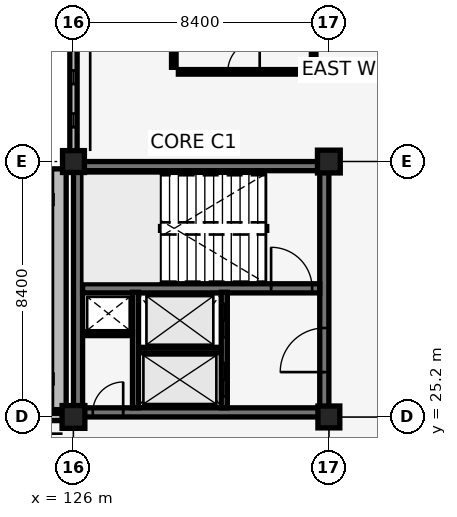
"""IFC4 building model, lengths in metres.
Left out: names, types, materials, properties, quantities, classifications, styles, units other than length and angle.
Written with IfcOpenShell. Run it as: python <this file> out.ifc"""

import sys

from ifc_helpers import new_model, si_unit, direction, frame, frame_2d, origin, origin_2d, place, context, subcontext, project, spatial, rectangle, extrude, element, fill, save


model = new_model("IFC4")
c1 = context("Model", 3, precision=1e-05, world=origin(), true_north=direction((0.0, 1.0)))
c2 = subcontext(c1, "Body", "Model", "MODEL_VIEW")
j1 = project(units=[si_unit("LENGTHUNIT", "METRE"), si_unit("PLANEANGLEUNIT", "RADIAN")], contexts=[c1])
p1 = place(None, origin())
s1 = spatial("IfcSite", under=j1, at=p1, CompositionType="ELEMENT")
p2 = place(p1, origin())
s2 = spatial("IfcBuilding", under=s1, at=p2, CompositionType="ELEMENT")
p3 = place(p2, frame((0.0, 0.0, 5.44)))
s3 = spatial("IfcBuildingStorey", under=s2, at=p3, CompositionType="ELEMENT", Elevation=5.44)
p4 = place(p3, frame((126.15, 25.35, 0.0), z_axis=(0.0, 0.0, 1.0), x_axis=(1.0, 0.0, 0.0)))
e1 = element("IfcWall", 1, at=p4, inside=s3, PredefinedType="SHEAR", context=c2, shape_type="SweptSolid", body=[
    extrude(rectangle(XDim=8.1, YDim=0.3, at=frame_2d((4.05, 0.0))), origin(), (0.0, 0.0, 1.0), 4.12),
])
p5 = place(p4, frame((0.485, 0.0, 0.0)))
e2 = element("IfcOpeningElement", 2, at=p5, cuts=e1, PredefinedType="OPENING", context=c2, shape_type="SweptSolid", body=[
    extrude(rectangle(XDim=1.0, YDim=2.15, at=frame_2d((0.5, 1.075))), frame((0.0, 0.16, 0.0), z_axis=(0.0, -1.0, 0.0), x_axis=(1.0, 0.0, 0.0)), (0.0, 0.0, 1.0), 0.32),
])
p6 = place(p3, frame((126.15, 33.45, 0.0), z_axis=(0.0, 0.0, 1.0), x_axis=(1.0, 0.0, 0.0)))
e3 = element("IfcWall", 3, at=p6, inside=s3, PredefinedType="SHEAR", context=c2, shape_type="SweptSolid", body=[
    extrude(rectangle(XDim=8.1, YDim=0.3, at=frame_2d((4.05, 0.0))), origin(), (0.0, 0.0, 1.0), 4.12),
])
p7 = place(p3, frame((126.15, 25.35, 0.0), z_axis=(0.0, 0.0, 1.0), x_axis=(0.0, 1.0, 0.0)))
e4 = element("IfcWall", 4, at=p7, inside=s3, PredefinedType="SHEAR", context=c2, shape_type="SweptSolid", body=[
    extrude(rectangle(XDim=8.1, YDim=0.3, at=frame_2d((4.05, 0.0))), origin(), (0.0, 0.0, 1.0), 4.12),
])
p8 = place(p3, frame((134.25, 25.35, 0.0), z_axis=(0.0, 0.0, 1.0), x_axis=(0.0, 1.0, 0.0)))
e5 = element("IfcWall", 5, at=p8, inside=s3, PredefinedType="SHEAR", context=c2, shape_type="SweptSolid", body=[
    extrude(rectangle(XDim=8.1, YDim=0.3, at=frame_2d((4.05, 0.0))), origin(), (0.0, 0.0, 1.0), 4.12),
])
p9 = place(p8, frame((1.325, 0.0, 0.0)))
e6 = element("IfcOpeningElement", 6, at=p9, cuts=e5, PredefinedType="OPENING", context=c2, shape_type="SweptSolid", body=[
    extrude(rectangle(XDim=1.45, YDim=2.15, at=frame_2d((0.725, 1.075))), frame((0.0, 0.16, 0.0), z_axis=(0.0, -1.0, 0.0), x_axis=(1.0, 0.0, 0.0)), (0.0, 0.0, 1.0), 0.32),
])
p10 = place(p3, frame((126.3, 29.43, 0.0), z_axis=(0.0, 0.0, 1.0), x_axis=(1.0, 0.0, 0.0)))
e7 = element("IfcWall", 7, at=p10, inside=s3, PredefinedType="SHEAR", context=c2, shape_type="SweptSolid", body=[
    extrude(rectangle(XDim=7.8, YDim=0.3, at=frame_2d((3.9, 0.0))), origin(), (0.0, 0.0, 1.0), 4.12),
])
p11 = place(p10, frame((6.2, 0.0, 0.0)))
e8 = element("IfcOpeningElement", 8, at=p11, cuts=e7, PredefinedType="OPENING", context=c2, shape_type="SweptSolid", body=[
    extrude(rectangle(XDim=1.35, YDim=2.15, at=frame_2d((0.675, 1.075))), frame((0.0, 0.16, 0.0), z_axis=(0.0, -1.0, 0.0), x_axis=(1.0, 0.0, 0.0)), (0.0, 0.0, 1.0), 0.32),
])
p12 = place(p3, frame((126.0, 25.2, 0.0), z_axis=(0.0, 0.0, 1.0), x_axis=(1.0, 0.0, 0.0)))
e9 = element("IfcColumn", 9, at=p12, inside=s3, PredefinedType="COLUMN", context=c2, shape_type="SweptSolid", body=[
    extrude(rectangle(XDim=0.75, YDim=0.75, at=origin_2d()), origin(), (0.0, 0.0, 1.0), 4.12),
])
for number, where, z_axis, x_axis in (
    (10, (126.0, 33.6, 0.0), (0.0, 0.0, 1.0), (1.0, 0.0, 0.0)),
    (11, (134.4, 25.2, 0.0), (0.0, 0.0, 1.0), (1.0, 0.0, 0.0)),
):
    element("IfcColumn", number, at=place(p3, frame(where, z_axis=z_axis, x_axis=x_axis)), inside=s3, PredefinedType="COLUMN", context=c2, shape_type="SweptSolid", body=[
        extrude(rectangle(XDim=0.72, YDim=0.72, at=origin_2d()), origin(), (0.0, 0.0, 1.0), 4.12),
    ])
p13 = place(p3, frame((134.4, 33.6, 0.0), z_axis=(0.0, 0.0, 1.0), x_axis=(1.0, 0.0, 0.0)))
e12 = element("IfcColumn", 12, at=p13, inside=s3, PredefinedType="COLUMN", context=c2, shape_type="SweptSolid", body=[
    extrude(rectangle(XDim=0.75, YDim=0.75, at=origin_2d()), origin(), (0.0, 0.0, 1.0), 4.12),
])
p14 = place(p3, frame((117.845, 25.2, 0.0), z_axis=(0.0, 0.0, 1.0), x_axis=(1.0, 0.0, 0.0)))
e13 = element("IfcWall", 13, at=p14, inside=s3, PredefinedType="SOLIDWALL", context=c2, shape_type="SweptSolid", body=[
    extrude(rectangle(XDim=7.795, YDim=0.24, at=frame_2d((3.897, 0.0))), origin(), (0.0, 0.0, 1.0), 3.37),
])
p15 = place(p14, frame((0.8, 0.0, 0.35)))
e14 = element("IfcOpeningElement", 14, at=p15, cuts=e13, PredefinedType="OPENING", context=c2, shape_type="SweptSolid", body=[
    extrude(rectangle(XDim=0.44, YDim=1.25, at=frame_2d((0.22, 0.625))), frame((0.0, 0.13, 0.0), z_axis=(0.0, -1.0, 0.0), x_axis=(1.0, 0.0, 0.0)), (0.0, 0.0, 1.0), 0.26),
])
p16 = place(p14, frame((2.239, 0.0, 0.35)))
e15 = element("IfcOpeningElement", 15, at=p16, cuts=e13, PredefinedType="OPENING", context=c2, shape_type="SweptSolid", body=[
    extrude(rectangle(XDim=0.44, YDim=1.25, at=frame_2d((0.22, 0.625))), frame((0.0, 0.13, 0.0), z_axis=(0.0, -1.0, 0.0), x_axis=(1.0, 0.0, 0.0)), (0.0, 0.0, 1.0), 0.26),
])
p17 = place(p14, frame((3.677, 0.0, 0.35)))
e16 = element("IfcOpeningElement", 16, at=p17, cuts=e13, PredefinedType="OPENING", context=c2, shape_type="SweptSolid", body=[
    extrude(rectangle(XDim=0.44, YDim=1.25, at=frame_2d((0.22, 0.625))), frame((0.0, 0.13, 0.0), z_axis=(0.0, -1.0, 0.0), x_axis=(1.0, 0.0, 0.0)), (0.0, 0.0, 1.0), 0.26),
])
p18 = place(p14, frame((5.116, 0.0, 0.35)))
e17 = element("IfcOpeningElement", 17, at=p18, cuts=e13, PredefinedType="OPENING", context=c2, shape_type="SweptSolid", body=[
    extrude(rectangle(XDim=0.44, YDim=1.25, at=frame_2d((0.22, 0.625))), frame((0.0, 0.13, 0.0), z_axis=(0.0, -1.0, 0.0), x_axis=(1.0, 0.0, 0.0)), (0.0, 0.0, 1.0), 0.26),
])
p19 = place(p14, frame((0.8, 0.0, 1.8)))
e18 = element("IfcOpeningElement", 18, at=p19, cuts=e13, PredefinedType="OPENING", context=c2, shape_type="SweptSolid", body=[
    extrude(rectangle(XDim=0.44, YDim=1.25, at=frame_2d((0.22, 0.625))), frame((0.0, 0.13, 0.0), z_axis=(0.0, -1.0, 0.0), x_axis=(1.0, 0.0, 0.0)), (0.0, 0.0, 1.0), 0.26),
])
p20 = place(p14, frame((2.239, 0.0, 1.8)))
e19 = element("IfcOpeningElement", 19, at=p20, cuts=e13, PredefinedType="OPENING", context=c2, shape_type="SweptSolid", body=[
    extrude(rectangle(XDim=0.44, YDim=1.25, at=frame_2d((0.22, 0.625))), frame((0.0, 0.13, 0.0), z_axis=(0.0, -1.0, 0.0), x_axis=(1.0, 0.0, 0.0)), (0.0, 0.0, 1.0), 0.26),
])
p21 = place(p14, frame((3.677, 0.0, 1.8)))
e20 = element("IfcOpeningElement", 20, at=p21, cuts=e13, PredefinedType="OPENING", context=c2, shape_type="SweptSolid", body=[
    extrude(rectangle(XDim=0.44, YDim=1.25, at=frame_2d((0.22, 0.625))), frame((0.0, 0.13, 0.0), z_axis=(0.0, -1.0, 0.0), x_axis=(1.0, 0.0, 0.0)), (0.0, 0.0, 1.0), 0.26),
])
p22 = place(p14, frame((5.116, 0.0, 1.8)))
e21 = element("IfcOpeningElement", 21, at=p22, cuts=e13, PredefinedType="OPENING", context=c2, shape_type="SweptSolid", body=[
    extrude(rectangle(XDim=0.44, YDim=1.25, at=frame_2d((0.22, 0.625))), frame((0.0, 0.13, 0.0), z_axis=(0.0, -1.0, 0.0), x_axis=(1.0, 0.0, 0.0)), (0.0, 0.0, 1.0), 0.26),
])
p23 = place(p3, frame((125.52, 25.44, 0.0), z_axis=(0.0, 0.0, 1.0), x_axis=(0.0, 1.0, 0.0)))
e22 = element("IfcWall", 22, at=p23, inside=s3, PredefinedType="SOLIDWALL", context=c2, shape_type="SweptSolid", body=[
    extrude(rectangle(XDim=7.92, YDim=0.48, at=frame_2d((3.96, 0.0))), origin(), (0.0, 0.0, 1.0), 4.42),
])
p24 = place(p3, frame((126.0, 33.945, 0.0), z_axis=(0.0, 0.0, 1.0), x_axis=(0.0, 1.0, 0.0)))
e23 = element("IfcWall", 23, at=p24, inside=s3, PredefinedType="SOLIDWALL", context=c2, shape_type="SweptSolid", body=[
    extrude(rectangle(XDim=7.695, YDim=0.24, at=frame_2d((3.847, 0.0))), origin(), (0.0, 0.0, 1.0), 3.37),
])
p25 = place(p24, frame((0.79, 0.0, 0.35)))
e24 = element("IfcOpeningElement", 24, at=p25, cuts=e23, PredefinedType="OPENING", context=c2, shape_type="SweptSolid", body=[
    extrude(rectangle(XDim=0.44, YDim=1.25, at=frame_2d((0.22, 0.625))), frame((0.0, 0.13, 0.0), z_axis=(0.0, -1.0, 0.0), x_axis=(1.0, 0.0, 0.0)), (0.0, 0.0, 1.0), 0.26),
])
p26 = place(p24, frame((2.208, 0.0, 0.35)))
e25 = element("IfcOpeningElement", 25, at=p26, cuts=e23, PredefinedType="OPENING", context=c2, shape_type="SweptSolid", body=[
    extrude(rectangle(XDim=0.44, YDim=1.25, at=frame_2d((0.22, 0.625))), frame((0.0, 0.13, 0.0), z_axis=(0.0, -1.0, 0.0), x_axis=(1.0, 0.0, 0.0)), (0.0, 0.0, 1.0), 0.26),
])
p27 = place(p24, frame((3.627, 0.0, 0.35)))
e26 = element("IfcOpeningElement", 26, at=p27, cuts=e23, PredefinedType="OPENING", context=c2, shape_type="SweptSolid", body=[
    extrude(rectangle(XDim=0.44, YDim=1.25, at=frame_2d((0.22, 0.625))), frame((0.0, 0.13, 0.0), z_axis=(0.0, -1.0, 0.0), x_axis=(1.0, 0.0, 0.0)), (0.0, 0.0, 1.0), 0.26),
])
p28 = place(p24, frame((5.046, 0.0, 0.35)))
e27 = element("IfcOpeningElement", 27, at=p28, cuts=e23, PredefinedType="OPENING", context=c2, shape_type="SweptSolid", body=[
    extrude(rectangle(XDim=0.44, YDim=1.25, at=frame_2d((0.22, 0.625))), frame((0.0, 0.13, 0.0), z_axis=(0.0, -1.0, 0.0), x_axis=(1.0, 0.0, 0.0)), (0.0, 0.0, 1.0), 0.26),
])
p29 = place(p24, frame((6.466, 0.0, 0.35)))
e28 = element("IfcOpeningElement", 28, at=p29, cuts=e23, PredefinedType="OPENING", context=c2, shape_type="SweptSolid", body=[
    extrude(rectangle(XDim=0.44, YDim=1.25, at=frame_2d((0.22, 0.625))), frame((0.0, 0.13, 0.0), z_axis=(0.0, -1.0, 0.0), x_axis=(1.0, 0.0, 0.0)), (0.0, 0.0, 1.0), 0.26),
])
p30 = place(p24, frame((0.79, 0.0, 1.8)))
e29 = element("IfcOpeningElement", 29, at=p30, cuts=e23, PredefinedType="OPENING", context=c2, shape_type="SweptSolid", body=[
    extrude(rectangle(XDim=0.44, YDim=1.25, at=frame_2d((0.22, 0.625))), frame((0.0, 0.13, 0.0), z_axis=(0.0, -1.0, 0.0), x_axis=(1.0, 0.0, 0.0)), (0.0, 0.0, 1.0), 0.26),
])
p31 = place(p24, frame((2.208, 0.0, 1.8)))
e30 = element("IfcOpeningElement", 30, at=p31, cuts=e23, PredefinedType="OPENING", context=c2, shape_type="SweptSolid", body=[
    extrude(rectangle(XDim=0.44, YDim=1.25, at=frame_2d((0.22, 0.625))), frame((0.0, 0.13, 0.0), z_axis=(0.0, -1.0, 0.0), x_axis=(1.0, 0.0, 0.0)), (0.0, 0.0, 1.0), 0.26),
])
p32 = place(p24, frame((3.627, 0.0, 1.8)))
e31 = element("IfcOpeningElement", 31, at=p32, cuts=e23, PredefinedType="OPENING", context=c2, shape_type="SweptSolid", body=[
    extrude(rectangle(XDim=0.44, YDim=1.25, at=frame_2d((0.22, 0.625))), frame((0.0, 0.13, 0.0), z_axis=(0.0, -1.0, 0.0), x_axis=(1.0, 0.0, 0.0)), (0.0, 0.0, 1.0), 0.26),
])
p33 = place(p24, frame((5.046, 0.0, 1.8)))
e32 = element("IfcOpeningElement", 32, at=p33, cuts=e23, PredefinedType="OPENING", context=c2, shape_type="SweptSolid", body=[
    extrude(rectangle(XDim=0.44, YDim=1.25, at=frame_2d((0.22, 0.625))), frame((0.0, 0.13, 0.0), z_axis=(0.0, -1.0, 0.0), x_axis=(1.0, 0.0, 0.0)), (0.0, 0.0, 1.0), 0.26),
])
p34 = place(p24, frame((6.466, 0.0, 1.8)))
e33 = element("IfcOpeningElement", 33, at=p34, cuts=e23, PredefinedType="OPENING", context=c2, shape_type="SweptSolid", body=[
    extrude(rectangle(XDim=0.44, YDim=1.25, at=frame_2d((0.22, 0.625))), frame((0.0, 0.13, 0.0), z_axis=(0.0, -1.0, 0.0), x_axis=(1.0, 0.0, 0.0)), (0.0, 0.0, 1.0), 0.26),
])
p35 = place(p3, frame((130.96, 25.5, 0.0), z_axis=(0.0, 0.0, 1.0), x_axis=(0.0, 1.0, 0.0)))
e34 = element("IfcWall", 34, at=p35, inside=s3, PredefinedType="SHEAR", context=c2, shape_type="SweptSolid", body=[
    extrude(rectangle(XDim=3.8, YDim=0.2, at=frame_2d((1.9, 0.0))), origin(), (0.0, 0.0, 1.0), 3.44),
])
p36 = place(p35, frame((0.375, 0.0, 0.0)))
e35 = element("IfcOpeningElement", 35, at=p36, cuts=e34, PredefinedType="OPENING", context=c2, shape_type="SweptSolid", body=[
    extrude(rectangle(XDim=1.1, YDim=2.15, at=frame_2d((0.55, 1.075))), frame((0.0, 0.11, 0.0), z_axis=(0.0, -1.0, 0.0), x_axis=(1.0, 0.0, 0.0)), (0.0, 0.0, 1.0), 0.22),
])
p37 = place(p35, frame((2.325, 0.0, 0.0)))
e36 = element("IfcOpeningElement", 36, at=p37, cuts=e34, PredefinedType="OPENING", context=c2, shape_type="SweptSolid", body=[
    extrude(rectangle(XDim=1.1, YDim=2.15, at=frame_2d((0.55, 1.075))), frame((0.0, 0.11, 0.0), z_axis=(0.0, -1.0, 0.0), x_axis=(1.0, 0.0, 0.0)), (0.0, 0.0, 1.0), 0.22),
])
p38 = place(p3, frame((128.04, 25.5, 0.0), z_axis=(0.0, 0.0, 1.0), x_axis=(0.0, 1.0, 0.0)))
e37 = element("IfcWall", 37, at=p38, inside=s3, PredefinedType="SHEAR", context=c2, shape_type="SweptSolid", body=[
    extrude(rectangle(XDim=3.8, YDim=0.2, at=frame_2d((1.9, 0.0))), origin(), (0.0, 0.0, 1.0), 3.44),
])
p39 = place(p3, frame((128.15, 27.4, 0.0), z_axis=(0.0, 0.0, 1.0), x_axis=(1.0, 0.0, 0.0)))
e38 = element("IfcWall", 38, at=p39, inside=s3, PredefinedType="SHEAR", context=c2, shape_type="SweptSolid", body=[
    extrude(rectangle(XDim=2.7, YDim=0.18, at=frame_2d((1.35, 0.0))), origin(), (0.0, 0.0, 1.0), 4.12),
])
p40 = place(p3, frame((126.32, 27.94, 0.0), z_axis=(0.0, 0.0, 1.0), x_axis=(1.0, 0.0, 0.0)))
e39 = element("IfcWall", 39, at=p40, inside=s3, PredefinedType="PARTITIONING", context=c2, shape_type="SweptSolid", body=[
    extrude(rectangle(XDim=1.62, YDim=0.13, at=frame_2d((0.81, 0.0))), origin(), (0.0, 0.0, 1.0), 3.37),
])
p41 = place(p3, frame((129.45, 36.55, 0.0), z_axis=(0.0, 0.0, 1.0), x_axis=(1.0, 0.0, 0.0)))
e40 = element("IfcWall", 40, at=p41, inside=s3, PredefinedType="PARTITIONING", context=c2, shape_type="SweptSolid", body=[
    extrude(rectangle(XDim=4.3, YDim=0.15, at=frame_2d((2.15, 0.0))), origin(), (0.0, 0.0, 1.0), 4.12),
])
p42 = place(p41, frame((1.625, 0.0, 0.0)))
e41 = element("IfcOpeningElement", 41, at=p42, cuts=e40, PredefinedType="OPENING", context=c2, shape_type="SweptSolid", body=[
    extrude(rectangle(XDim=1.05, YDim=2.15, at=frame_2d((0.525, 1.075))), frame((0.0, 0.085, 0.0), z_axis=(0.0, -1.0, 0.0), x_axis=(1.0, 0.0, 0.0)), (0.0, 0.0, 1.0), 0.17),
])
for number, where, z_axis, x_axis in (
    (42, (129.3, 36.7, 0.0), (0.0, 0.0, 1.0), (0.0, 1.0, 0.0)),
    (43, (133.9, 36.7, 0.0), (0.0, 0.0, 1.0), (0.0, 1.0, 0.0)),
):
    element("IfcWall", number, at=place(p3, frame(where, z_axis=z_axis, x_axis=x_axis)), inside=s3, PredefinedType="PARTITIONING", context=c2, shape_type="SweptSolid", body=[
        extrude(rectangle(XDim=47.27, YDim=0.15, at=frame_2d((23.635, 0.0))), origin(), (0.0, 0.0, 1.0), 3.34),
    ])
p43 = place(p25, origin())
e44 = element("IfcWindow", 44, at=p43, inside=s3, PartitioningType="SINGLE_PANEL", PredefinedType="WINDOW", context=c2, shape_type="SweptSolid", body=[
    extrude(rectangle(XDim=0.44, YDim=1.25, at=frame_2d((0.22, 0.625))), frame((0.0, 0.03, 0.0), z_axis=(0.0, -1.0, 0.0), x_axis=(1.0, 0.0, 0.0)), (0.0, 0.0, 1.0), 0.06),
])
fill(e24, e44)
p44 = place(p26, origin())
e45 = element("IfcWindow", 45, at=p44, inside=s3, PartitioningType="SINGLE_PANEL", PredefinedType="WINDOW", context=c2, shape_type="SweptSolid", body=[
    extrude(rectangle(XDim=0.44, YDim=1.25, at=frame_2d((0.22, 0.625))), frame((0.0, 0.03, 0.0), z_axis=(0.0, -1.0, 0.0), x_axis=(1.0, 0.0, 0.0)), (0.0, 0.0, 1.0), 0.06),
])
fill(e25, e45)
p45 = place(p30, origin())
e46 = element("IfcWindow", 46, at=p45, inside=s3, PartitioningType="SINGLE_PANEL", PredefinedType="WINDOW", context=c2, shape_type="SweptSolid", body=[
    extrude(rectangle(XDim=0.44, YDim=1.25, at=frame_2d((0.22, 0.625))), frame((0.0, 0.03, 0.0), z_axis=(0.0, -1.0, 0.0), x_axis=(1.0, 0.0, 0.0)), (0.0, 0.0, 1.0), 0.06),
])
fill(e29, e46)
p46 = place(p31, origin())
e47 = element("IfcWindow", 47, at=p46, inside=s3, PartitioningType="SINGLE_PANEL", PredefinedType="WINDOW", context=c2, shape_type="SweptSolid", body=[
    extrude(rectangle(XDim=0.44, YDim=1.25, at=frame_2d((0.22, 0.625))), frame((0.0, 0.03, 0.0), z_axis=(0.0, -1.0, 0.0), x_axis=(1.0, 0.0, 0.0)), (0.0, 0.0, 1.0), 0.06),
])
fill(e30, e47)
p47 = place(p11, origin())
e48 = element("IfcDoor", 48, at=p47, inside=s3, OperationType="SINGLE_SWING_LEFT", PredefinedType="DOOR", context=c2, shape_type="SweptSolid", body=[
    extrude(rectangle(XDim=1.35, YDim=2.15, at=frame_2d((0.675, 1.075))), frame((0.0, 0.025, 0.0), z_axis=(0.0, -1.0, 0.0), x_axis=(1.0, 0.0, 0.0)), (0.0, 0.0, 1.0), 0.05),
])
fill(e8, e48)
p48 = place(p36, origin())
e49 = element("IfcDoor", 49, at=p48, inside=s3, OperationType="SLIDING_TO_LEFT", PredefinedType="DOOR", context=c2, shape_type="SweptSolid", body=[
    extrude(rectangle(XDim=1.1, YDim=2.15, at=frame_2d((0.55, 1.075))), frame((0.0, 0.025, 0.0), z_axis=(0.0, -1.0, 0.0), x_axis=(1.0, 0.0, 0.0)), (0.0, 0.0, 1.0), 0.05),
])
fill(e35, e49)
p49 = place(p37, origin())
e50 = element("IfcDoor", 50, at=p49, inside=s3, OperationType="SLIDING_TO_LEFT", PredefinedType="DOOR", context=c2, shape_type="SweptSolid", body=[
    extrude(rectangle(XDim=1.1, YDim=2.15, at=frame_2d((0.55, 1.075))), frame((0.0, 0.025, 0.0), z_axis=(0.0, -1.0, 0.0), x_axis=(1.0, 0.0, 0.0)), (0.0, 0.0, 1.0), 0.05),
])
fill(e36, e50)
p50 = place(p9, origin())
e51 = element("IfcDoor", 51, at=p50, inside=s3, OperationType="DOUBLE_DOOR_SINGLE_SWING", PredefinedType="DOOR", context=c2, shape_type="SweptSolid", body=[
    extrude(rectangle(XDim=1.45, YDim=2.15, at=frame_2d((0.725, 1.075))), frame((0.0, 0.025, 0.0), z_axis=(0.0, -1.0, 0.0), x_axis=(1.0, 0.0, 0.0)), (0.0, 0.0, 1.0), 0.05),
])
fill(e6, e51)
p51 = place(p5, origin())
e52 = element("IfcDoor", 52, at=p51, inside=s3, OperationType="SINGLE_SWING_RIGHT", PredefinedType="DOOR", context=c2, shape_type="SweptSolid", body=[
    extrude(rectangle(XDim=1.0, YDim=2.15, at=frame_2d((0.5, 1.075))), frame((0.0, 0.025, 0.0), z_axis=(0.0, -1.0, 0.0), x_axis=(1.0, 0.0, 0.0)), (0.0, 0.0, 1.0), 0.05),
])
fill(e2, e52)
p52 = place(p42, origin())
e53 = element("IfcDoor", 53, at=p52, inside=s3, OperationType="SINGLE_SWING_RIGHT", PredefinedType="DOOR", context=c2, shape_type="SweptSolid", body=[
    extrude(rectangle(XDim=1.05, YDim=2.15, at=frame_2d((0.525, 1.075))), frame((0.0, 0.025, 0.0), z_axis=(0.0, -1.0, 0.0), x_axis=(1.0, 0.0, 0.0)), (0.0, 0.0, 1.0), 0.05),
])
fill(e41, e53)
save(model, sys.argv[1])
